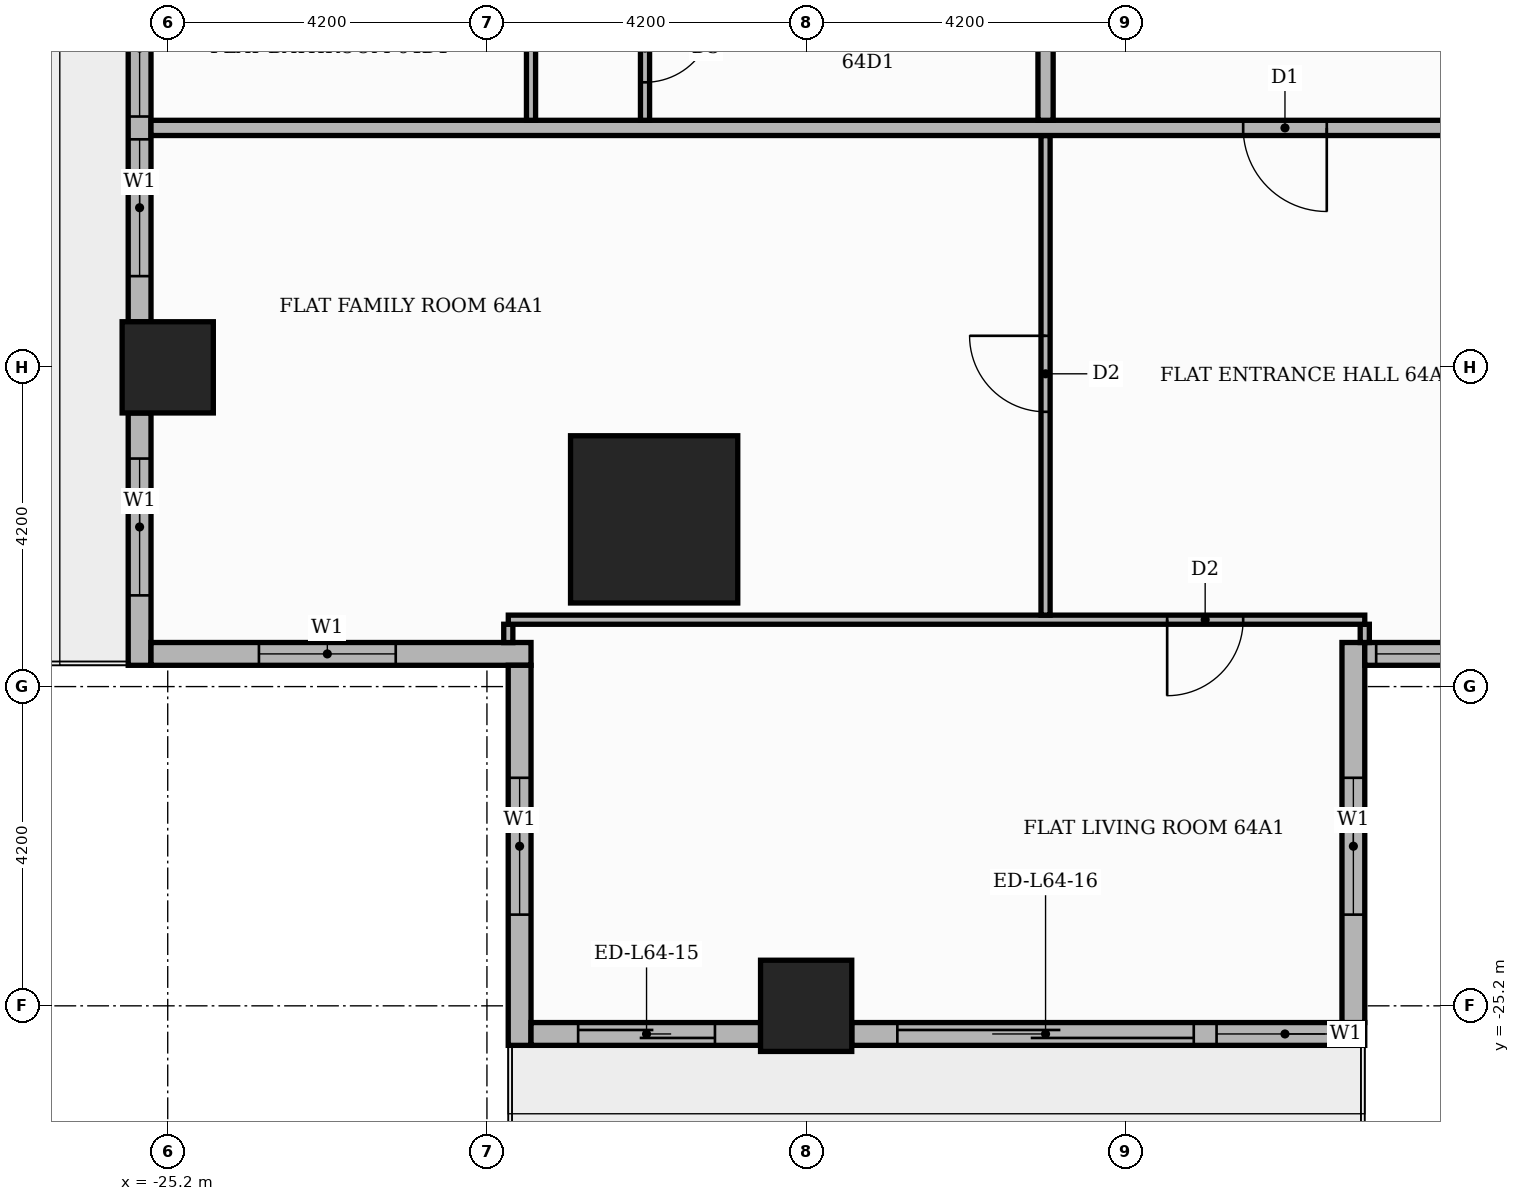
"""IFC4 building model, lengths in metres.
Left out: names, types, materials, properties, quantities, classifications, styles, units other than length and angle.
Written with IfcOpenShell. Run it as: python <this file> out.ifc"""

import sys

from ifc_helpers import new_model, si_unit, direction, frame, frame_2d, origin, origin_2d, place, context, subcontext, project, spatial, rectangle, extrude, element, fill, save


model = new_model("IFC4")
c1 = context("Model", 3, precision=1e-05, world=origin(), true_north=direction((0.0, 1.0)))
c2 = subcontext(c1, "Body", "Model", "MODEL_VIEW")
j1 = project(units=[si_unit("LENGTHUNIT", "METRE"), si_unit("PLANEANGLEUNIT", "RADIAN")], contexts=[c1])
p1 = place(None, origin())
s1 = spatial("IfcSite", under=j1, at=p1, CompositionType="ELEMENT")
p2 = place(p1, origin())
s2 = spatial("IfcBuilding", under=s1, at=p2, CompositionType="ELEMENT")
p3 = place(p2, frame((0.0, 0.0, 267.9)))
s3 = spatial("IfcBuildingStorey", under=s2, at=p3, CompositionType="ELEMENT", Elevation=267.9)
p4 = place(p3, frame((-18.8, -18.8, 0.0), z_axis=(0.0, 0.0, 1.0), x_axis=(1.0, 0.0, 0.0)))
e1 = element("IfcColumn", 1, at=p4, inside=s3, PredefinedType="COLUMN", context=c2, shape_type="SweptSolid", body=[
    extrude(rectangle(XDim=2.2, YDim=2.2, at=origin_2d()), origin(), (0.0, 0.0, 1.0), 3.9),
])
for number, where, z_axis, x_axis in (
    (2, (-16.8, -25.2, 0.0), (0.0, 0.0, 1.0), (1.0, 0.0, 0.0)),
    (3, (-25.2, -16.8, 0.0), (0.0, 0.0, 1.0), (1.0, 0.0, 0.0)),
):
    element("IfcColumn", number, at=place(p3, frame(where, z_axis=z_axis, x_axis=x_axis)), inside=s3, PredefinedType="COLUMN", context=c2, shape_type="SweptSolid", body=[
        extrude(rectangle(XDim=1.2, YDim=1.2, at=origin_2d()), origin(), (0.0, 0.0, 1.0), 3.9),
    ])
p5 = place(p3, frame((-25.57, -9.0, 0.0), z_axis=(0.0, 0.0, 1.0), x_axis=(0.0, -1.0, 0.0)))
e4 = element("IfcWall", 4, at=p5, inside=s3, PredefinedType="STANDARD", context=c2, shape_type="SweptSolid", body=[
    extrude(rectangle(XDim=7.2, YDim=0.3, at=frame_2d((3.6, 0.0))), origin(), (0.0, 0.0, 1.0), 3.48),
])
p6 = place(p5, frame((0.6, 0.0, 0.9)))
e5 = element("IfcOpeningElement", 5, at=p6, cuts=e4, PredefinedType="OPENING", context=c2, shape_type="SweptSolid", body=[
    extrude(rectangle(XDim=1.8, YDim=2.1, at=frame_2d((0.9, 1.05))), frame((0.0, 0.16, 0.0), z_axis=(0.0, -1.0, 0.0), x_axis=(1.0, 0.0, 0.0)), (0.0, 0.0, 1.0), 0.32),
])
p7 = place(p5, frame((2.7, 0.0, 0.9)))
e6 = element("IfcOpeningElement", 6, at=p7, cuts=e4, PredefinedType="OPENING", context=c2, shape_type="SweptSolid", body=[
    extrude(rectangle(XDim=1.8, YDim=2.1, at=frame_2d((0.9, 1.05))), frame((0.0, 0.16, 0.0), z_axis=(0.0, -1.0, 0.0), x_axis=(1.0, 0.0, 0.0)), (0.0, 0.0, 1.0), 0.32),
])
p8 = place(p5, frame((4.8, 0.0, 0.9)))
e7 = element("IfcOpeningElement", 7, at=p8, cuts=e4, PredefinedType="OPENING", context=c2, shape_type="SweptSolid", body=[
    extrude(rectangle(XDim=1.8, YDim=2.1, at=frame_2d((0.9, 1.05))), frame((0.0, 0.16, 0.0), z_axis=(0.0, -1.0, 0.0), x_axis=(1.0, 0.0, 0.0)), (0.0, 0.0, 1.0), 0.32),
])
p9 = place(p3, frame((-25.57, -17.4, 0.0), z_axis=(0.0, 0.0, 1.0), x_axis=(0.0, -1.0, 0.0)))
e8 = element("IfcWall", 8, at=p9, inside=s3, PredefinedType="STANDARD", context=c2, shape_type="SweptSolid", body=[
    extrude(rectangle(XDim=3.32, YDim=0.3, at=frame_2d((1.66, 0.0))), origin(), (0.0, 0.0, 1.0), 3.48),
])
p10 = place(p9, frame((0.6, 0.0, 0.9)))
e9 = element("IfcOpeningElement", 9, at=p10, cuts=e8, PredefinedType="OPENING", context=c2, shape_type="SweptSolid", body=[
    extrude(rectangle(XDim=1.8, YDim=2.1, at=frame_2d((0.9, 1.05))), frame((0.0, 0.16, 0.0), z_axis=(0.0, -1.0, 0.0), x_axis=(1.0, 0.0, 0.0)), (0.0, 0.0, 1.0), 0.32),
])
p11 = place(p3, frame((-25.42, -20.57, 0.0), z_axis=(0.0, 0.0, 1.0), x_axis=(1.0, 0.0, 0.0)))
e10 = element("IfcWall", 10, at=p11, inside=s3, PredefinedType="STANDARD", context=c2, shape_type="SweptSolid", body=[
    extrude(rectangle(XDim=5.0, YDim=0.3, at=frame_2d((2.5, 0.0))), origin(), (0.0, 0.0, 1.0), 3.48),
])
p12 = place(p11, frame((1.42, 0.0, 0.9)))
e11 = element("IfcOpeningElement", 11, at=p12, cuts=e10, PredefinedType="OPENING", context=c2, shape_type="SweptSolid", body=[
    extrude(rectangle(XDim=1.8, YDim=2.1, at=frame_2d((0.9, 1.05))), frame((0.0, 0.16, 0.0), z_axis=(0.0, -1.0, 0.0), x_axis=(1.0, 0.0, 0.0)), (0.0, 0.0, 1.0), 0.32),
])
p13 = place(p3, frame((-20.57, -20.72, 0.0), z_axis=(0.0, 0.0, 1.0), x_axis=(0.0, -1.0, 0.0)))
e12 = element("IfcWall", 12, at=p13, inside=s3, PredefinedType="STANDARD", context=c2, shape_type="SweptSolid", body=[
    extrude(rectangle(XDim=5.0, YDim=0.3, at=frame_2d((2.5, 0.0))), origin(), (0.0, 0.0, 1.0), 3.48),
])
p14 = place(p13, frame((1.48, 0.0, 0.9)))
e13 = element("IfcOpeningElement", 13, at=p14, cuts=e12, PredefinedType="OPENING", context=c2, shape_type="SweptSolid", body=[
    extrude(rectangle(XDim=1.8, YDim=2.1, at=frame_2d((0.9, 1.05))), frame((0.0, 0.16, 0.0), z_axis=(0.0, -1.0, 0.0), x_axis=(1.0, 0.0, 0.0)), (0.0, 0.0, 1.0), 0.32),
])
p15 = place(p3, frame((-20.42, -25.57, 0.0), z_axis=(0.0, 0.0, 1.0), x_axis=(1.0, 0.0, 0.0)))
e14 = element("IfcWall", 14, at=p15, inside=s3, PredefinedType="STANDARD", context=c2, shape_type="SweptSolid", body=[
    extrude(rectangle(XDim=3.02, YDim=0.3, at=frame_2d((1.51, 0.0))), origin(), (0.0, 0.0, 1.0), 3.48),
])
p16 = place(p15, frame((0.62, 0.0, 0.0)))
e15 = element("IfcOpeningElement", 15, at=p16, cuts=e14, PredefinedType="OPENING", context=c2, shape_type="SweptSolid", body=[
    extrude(rectangle(XDim=1.8, YDim=2.4, at=frame_2d((0.9, 1.2))), frame((0.0, 0.16, 0.0), z_axis=(0.0, -1.0, 0.0), x_axis=(1.0, 0.0, 0.0)), (0.0, 0.0, 1.0), 0.32),
])
p17 = place(p3, frame((-16.2, -25.57, 0.0), z_axis=(0.0, 0.0, 1.0), x_axis=(1.0, 0.0, 0.0)))
e16 = element("IfcWall", 16, at=p17, inside=s3, PredefinedType="STANDARD", context=c2, shape_type="SweptSolid", body=[
    extrude(rectangle(XDim=6.75, YDim=0.3, at=frame_2d((3.375, 0.0))), origin(), (0.0, 0.0, 1.0), 3.48),
])
p18 = place(p17, frame((0.6, 0.0, 0.0)))
e17 = element("IfcOpeningElement", 17, at=p18, cuts=e16, PredefinedType="OPENING", context=c2, shape_type="SweptSolid", body=[
    extrude(rectangle(XDim=3.9, YDim=2.4, at=frame_2d((1.95, 1.2))), frame((0.0, 0.16, 0.0), z_axis=(0.0, -1.0, 0.0), x_axis=(1.0, 0.0, 0.0)), (0.0, 0.0, 1.0), 0.32),
])
p19 = place(p17, frame((4.8, 0.0, 0.9)))
e18 = element("IfcOpeningElement", 18, at=p19, cuts=e16, PredefinedType="OPENING", context=c2, shape_type="SweptSolid", body=[
    extrude(rectangle(XDim=1.8, YDim=2.1, at=frame_2d((0.9, 1.05))), frame((0.0, 0.16, 0.0), z_axis=(0.0, -1.0, 0.0), x_axis=(1.0, 0.0, 0.0)), (0.0, 0.0, 1.0), 0.32),
])
p20 = place(p3, frame((-9.6, -25.42, 0.0), z_axis=(0.0, 0.0, 1.0), x_axis=(0.0, 1.0, 0.0)))
e19 = element("IfcWall", 19, at=p20, inside=s3, PredefinedType="STANDARD", context=c2, shape_type="SweptSolid", body=[
    extrude(rectangle(XDim=5.0, YDim=0.3, at=frame_2d((2.5, 0.0))), origin(), (0.0, 0.0, 1.0), 3.48),
])
p21 = place(p20, frame((1.42, 0.0, 0.9)))
e20 = element("IfcOpeningElement", 20, at=p21, cuts=e19, PredefinedType="OPENING", context=c2, shape_type="SweptSolid", body=[
    extrude(rectangle(XDim=1.8, YDim=2.1, at=frame_2d((0.9, 1.05))), frame((0.0, 0.16, 0.0), z_axis=(0.0, -1.0, 0.0), x_axis=(1.0, 0.0, 0.0)), (0.0, 0.0, 1.0), 0.32),
])
p22 = place(p3, frame((-9.45, -20.57, 0.0), z_axis=(0.0, 0.0, 1.0), x_axis=(1.0, 0.0, 0.0)))
e21 = element("IfcWall", 21, at=p22, inside=s3, PredefinedType="STANDARD", context=c2, shape_type="SweptSolid", body=[
    extrude(rectangle(XDim=19.2, YDim=0.3, at=frame_2d((9.6, 0.0))), origin(), (0.0, 0.0, 1.0), 3.48),
])
p23 = place(p22, frame((0.15, 0.0, 0.9)))
e22 = element("IfcOpeningElement", 22, at=p23, cuts=e21, PredefinedType="OPENING", context=c2, shape_type="SweptSolid", body=[
    extrude(rectangle(XDim=6.0, YDim=2.1, at=frame_2d((3.0, 1.05))), frame((0.0, 0.16, 0.0), z_axis=(0.0, -1.0, 0.0), x_axis=(1.0, 0.0, 0.0)), (0.0, 0.0, 1.0), 0.32),
])
p24 = place(p22, frame((6.45, 0.0, 0.9)))
e23 = element("IfcOpeningElement", 23, at=p24, cuts=e21, PredefinedType="OPENING", context=c2, shape_type="SweptSolid", body=[
    extrude(rectangle(XDim=6.0, YDim=2.1, at=frame_2d((3.0, 1.05))), frame((0.0, 0.16, 0.0), z_axis=(0.0, -1.0, 0.0), x_axis=(1.0, 0.0, 0.0)), (0.0, 0.0, 1.0), 0.32),
])
p25 = place(p22, frame((12.75, 0.0, 0.9)))
e24 = element("IfcOpeningElement", 24, at=p25, cuts=e21, PredefinedType="OPENING", context=c2, shape_type="SweptSolid", body=[
    extrude(rectangle(XDim=6.0, YDim=2.1, at=frame_2d((3.0, 1.05))), frame((0.0, 0.16, 0.0), z_axis=(0.0, -1.0, 0.0), x_axis=(1.0, 0.0, 0.0)), (0.0, 0.0, 1.0), 0.32),
])
p26 = place(p3, frame((-20.719, -20.421, 0.0), z_axis=(0.0, 0.0, 1.0), x_axis=(0.0, 1.0, 0.0)))
e25 = element("IfcWall", 25, at=p26, inside=s3, PredefinedType="PARTITIONING", context=c2, shape_type="SweptSolid", body=[
    extrude(rectangle(XDim=0.241, YDim=0.12, at=frame_2d((0.121, 0.0))), origin(), (0.0, 0.0, 1.0), 3.48),
])
p27 = place(p3, frame((-9.45, -20.42, 0.0), z_axis=(0.0, 0.0, 1.0), x_axis=(0.0, 1.0, 0.0)))
e26 = element("IfcWall", 26, at=p27, inside=s3, PredefinedType="PARTITIONING", context=c2, shape_type="SweptSolid", body=[
    extrude(rectangle(XDim=0.24, YDim=0.12, at=frame_2d((0.12, 0.0))), origin(), (0.0, 0.0, 1.0), 3.48),
])
p28 = place(p3, frame((-20.719, -20.12, 0.0), z_axis=(0.0, 0.0, 1.0), x_axis=(1.0, 0.0, 0.0)))
e27 = element("IfcWall", 27, at=p28, inside=s3, PredefinedType="PARTITIONING", context=c2, shape_type="SweptSolid", body=[
    extrude(rectangle(XDim=11.269, YDim=0.12, at=frame_2d((5.635, 0.0))), origin(), (0.0, 0.0, 1.0), 3.48),
])
p29 = place(p28, frame((8.669, 0.0, 0.0)))
e28 = element("IfcOpeningElement", 28, at=p29, cuts=e27, PredefinedType="OPENING", context=c2, shape_type="SweptSolid", body=[
    extrude(rectangle(XDim=1.0, YDim=2.1, at=frame_2d((0.5, 1.05))), frame((0.0, 0.07, 0.0), z_axis=(0.0, -1.0, 0.0), x_axis=(1.0, 0.0, 0.0)), (0.0, 0.0, 1.0), 0.14),
])
p30 = place(p3, frame((-13.65, -20.06, 0.0), z_axis=(0.0, 0.0, 1.0), x_axis=(0.0, 1.0, 0.0)))
e29 = element("IfcWall", 29, at=p30, inside=s3, PredefinedType="PARTITIONING", context=c2, shape_type="SweptSolid", body=[
    extrude(rectangle(XDim=6.31, YDim=0.12, at=frame_2d((3.155, 0.0))), origin(), (0.0, 0.0, 1.0), 3.48),
])
p31 = place(p30, frame((2.675, 0.0, 0.0)))
e30 = element("IfcOpeningElement", 30, at=p31, cuts=e29, PredefinedType="OPENING", context=c2, shape_type="SweptSolid", body=[
    extrude(rectangle(XDim=1.0, YDim=2.1, at=frame_2d((0.5, 1.05))), frame((0.0, 0.07, 0.0), z_axis=(0.0, -1.0, 0.0), x_axis=(1.0, 0.0, 0.0)), (0.0, 0.0, 1.0), 0.14),
])
p32 = place(p3, frame((-25.42, -13.65, 0.0), z_axis=(0.0, 0.0, 1.0), x_axis=(1.0, 0.0, 0.0)))
e31 = element("IfcWall", 31, at=p32, inside=s3, PredefinedType="PARTITIONING", context=c2, shape_type="SweptSolid", body=[
    extrude(rectangle(XDim=39.07, YDim=0.2, at=frame_2d((19.535, 0.0))), origin(), (0.0, 0.0, 1.0), 3.48),
])
p33 = place(p32, frame((14.37, 0.0, 0.0)))
e32 = element("IfcOpeningElement", 32, at=p33, cuts=e31, PredefinedType="OPENING", context=c2, shape_type="SweptSolid", body=[
    extrude(rectangle(XDim=1.1, YDim=2.4, at=frame_2d((0.55, 1.2))), frame((0.0, 0.11, 0.0), z_axis=(0.0, -1.0, 0.0), x_axis=(1.0, 0.0, 0.0)), (0.0, 0.0, 1.0), 0.22),
])
p34 = place(p3, frame((-20.42, -13.55, 0.0), z_axis=(0.0, 0.0, 1.0), x_axis=(0.0, 1.0, 0.0)))
e33 = element("IfcWall", 33, at=p34, inside=s3, PredefinedType="PARTITIONING", context=c2, shape_type="SweptSolid", body=[
    extrude(rectangle(XDim=1.94, YDim=0.12, at=frame_2d((0.97, 0.0))), origin(), (0.0, 0.0, 1.0), 3.48),
])
p35 = place(p3, frame((-18.92, -13.55, 0.0), z_axis=(0.0, 0.0, 1.0), x_axis=(0.0, 1.0, 0.0)))
e34 = element("IfcWall", 34, at=p35, inside=s3, PredefinedType="PARTITIONING", context=c2, shape_type="SweptSolid", body=[
    extrude(rectangle(XDim=1.94, YDim=0.12, at=frame_2d((0.97, 0.0))), origin(), (0.0, 0.0, 1.0), 3.48),
])
p36 = place(p35, frame((0.5, 0.0, 0.0)))
e35 = element("IfcOpeningElement", 35, at=p36, cuts=e34, PredefinedType="OPENING", context=c2, shape_type="SweptSolid", body=[
    extrude(rectangle(XDim=0.9, YDim=2.1, at=frame_2d((0.45, 1.05))), frame((0.0, 0.07, 0.0), z_axis=(0.0, -1.0, 0.0), x_axis=(1.0, 0.0, 0.0)), (0.0, 0.0, 1.0), 0.14),
])
p37 = place(p3, frame((-13.65, -13.55, 0.0), z_axis=(0.0, 0.0, 1.0), x_axis=(0.0, 1.0, 0.0)))
e36 = element("IfcWall", 36, at=p37, inside=s3, PredefinedType="PARTITIONING", context=c2, shape_type="SweptSolid", body=[
    extrude(rectangle(XDim=2.45, YDim=0.2, at=frame_2d((1.225, 0.0))), origin(), (0.0, 0.0, 1.0), 3.48),
])
p38 = place(p7, origin())
e37 = element("IfcWindow", 37, at=p38, inside=s3, PartitioningType="SINGLE_PANEL", PredefinedType="WINDOW", context=c2, shape_type="SweptSolid", body=[
    extrude(rectangle(XDim=1.8, YDim=2.1, at=frame_2d((0.9, 1.05))), frame((0.0, 0.03, 0.0), z_axis=(0.0, -1.0, 0.0), x_axis=(1.0, 0.0, 0.0)), (0.0, 0.0, 1.0), 0.06),
])
fill(e6, e37)
p39 = place(p8, origin())
e38 = element("IfcWindow", 38, at=p39, inside=s3, PartitioningType="SINGLE_PANEL", PredefinedType="WINDOW", context=c2, shape_type="SweptSolid", body=[
    extrude(rectangle(XDim=1.8, YDim=2.1, at=frame_2d((0.9, 1.05))), frame((0.0, 0.03, 0.0), z_axis=(0.0, -1.0, 0.0), x_axis=(1.0, 0.0, 0.0)), (0.0, 0.0, 1.0), 0.06),
])
fill(e7, e38)
p40 = place(p10, origin())
e39 = element("IfcWindow", 39, at=p40, inside=s3, PartitioningType="SINGLE_PANEL", PredefinedType="WINDOW", context=c2, shape_type="SweptSolid", body=[
    extrude(rectangle(XDim=1.8, YDim=2.1, at=frame_2d((0.9, 1.05))), frame((0.0, 0.03, 0.0), z_axis=(0.0, -1.0, 0.0), x_axis=(1.0, 0.0, 0.0)), (0.0, 0.0, 1.0), 0.06),
])
fill(e9, e39)
p41 = place(p12, origin())
e40 = element("IfcWindow", 40, at=p41, inside=s3, PartitioningType="SINGLE_PANEL", PredefinedType="WINDOW", context=c2, shape_type="SweptSolid", body=[
    extrude(rectangle(XDim=1.8, YDim=2.1, at=frame_2d((0.9, 1.05))), frame((0.0, 0.03, 0.0), z_axis=(0.0, -1.0, 0.0), x_axis=(1.0, 0.0, 0.0)), (0.0, 0.0, 1.0), 0.06),
])
fill(e11, e40)
p42 = place(p14, origin())
e41 = element("IfcWindow", 41, at=p42, inside=s3, PartitioningType="SINGLE_PANEL", PredefinedType="WINDOW", context=c2, shape_type="SweptSolid", body=[
    extrude(rectangle(XDim=1.8, YDim=2.1, at=frame_2d((0.9, 1.05))), frame((0.0, 0.03, 0.0), z_axis=(0.0, -1.0, 0.0), x_axis=(1.0, 0.0, 0.0)), (0.0, 0.0, 1.0), 0.06),
])
fill(e13, e41)
p43 = place(p16, origin())
e42 = element("IfcDoor", 42, at=p43, inside=s3, OperationType="SLIDING_TO_RIGHT", PredefinedType="DOOR", context=c2, shape_type="SweptSolid", body=[
    extrude(rectangle(XDim=1.8, YDim=2.4, at=frame_2d((0.9, 1.2))), frame((0.0, 0.025, 0.0), z_axis=(0.0, -1.0, 0.0), x_axis=(1.0, 0.0, 0.0)), (0.0, 0.0, 1.0), 0.05),
])
fill(e15, e42)
p44 = place(p18, origin())
e43 = element("IfcDoor", 43, at=p44, inside=s3, OperationType="SLIDING_TO_LEFT", PredefinedType="DOOR", context=c2, shape_type="SweptSolid", body=[
    extrude(rectangle(XDim=3.9, YDim=2.4, at=frame_2d((1.95, 1.2))), frame((0.0, 0.025, 0.0), z_axis=(0.0, -1.0, 0.0), x_axis=(1.0, 0.0, 0.0)), (0.0, 0.0, 1.0), 0.05),
])
fill(e17, e43)
p45 = place(p19, origin())
e44 = element("IfcWindow", 44, at=p45, inside=s3, PartitioningType="SINGLE_PANEL", PredefinedType="WINDOW", context=c2, shape_type="SweptSolid", body=[
    extrude(rectangle(XDim=1.8, YDim=2.1, at=frame_2d((0.9, 1.05))), frame((0.0, 0.03, 0.0), z_axis=(0.0, -1.0, 0.0), x_axis=(1.0, 0.0, 0.0)), (0.0, 0.0, 1.0), 0.06),
])
fill(e18, e44)
p46 = place(p21, origin())
e45 = element("IfcWindow", 45, at=p46, inside=s3, PartitioningType="SINGLE_PANEL", PredefinedType="WINDOW", context=c2, shape_type="SweptSolid", body=[
    extrude(rectangle(XDim=1.8, YDim=2.1, at=frame_2d((0.9, 1.05))), frame((0.0, 0.03, 0.0), z_axis=(0.0, -1.0, 0.0), x_axis=(1.0, 0.0, 0.0)), (0.0, 0.0, 1.0), 0.06),
])
fill(e20, e45)
p47 = place(p23, origin())
e46 = element("IfcWindow", 46, at=p47, inside=s3, PartitioningType="SINGLE_PANEL", PredefinedType="WINDOW", context=c2, shape_type="SweptSolid", body=[
    extrude(rectangle(XDim=6.0, YDim=2.1, at=frame_2d((3.0, 1.05))), frame((0.0, 0.03, 0.0), z_axis=(0.0, -1.0, 0.0), x_axis=(1.0, 0.0, 0.0)), (0.0, 0.0, 1.0), 0.06),
])
fill(e22, e46)
p48 = place(p33, frame((1.1, 0.0, 0.0), z_axis=(0.0, 0.0, 1.0), x_axis=(-1.0, 0.0, 0.0)))
e47 = element("IfcDoor", 47, at=p48, inside=s3, OperationType="SINGLE_SWING_RIGHT", PredefinedType="DOOR", context=c2, shape_type="SweptSolid", body=[
    extrude(rectangle(XDim=1.1, YDim=2.4, at=frame_2d((0.55, 1.2))), frame((0.0, 0.025, 0.0), z_axis=(0.0, -1.0, 0.0), x_axis=(1.0, 0.0, 0.0)), (0.0, 0.0, 1.0), 0.05),
])
fill(e32, e47)
p49 = place(p31, origin())
e48 = element("IfcDoor", 48, at=p49, inside=s3, OperationType="SINGLE_SWING_RIGHT", PredefinedType="DOOR", context=c2, shape_type="SweptSolid", body=[
    extrude(rectangle(XDim=1.0, YDim=2.1, at=frame_2d((0.5, 1.05))), frame((0.0, 0.025, 0.0), z_axis=(0.0, -1.0, 0.0), x_axis=(1.0, 0.0, 0.0)), (0.0, 0.0, 1.0), 0.05),
])
fill(e30, e48)
p50 = place(p29, frame((1.0, 0.0, 0.0), z_axis=(0.0, 0.0, 1.0), x_axis=(-1.0, 0.0, 0.0)))
e49 = element("IfcDoor", 49, at=p50, inside=s3, OperationType="SINGLE_SWING_LEFT", PredefinedType="DOOR", context=c2, shape_type="SweptSolid", body=[
    extrude(rectangle(XDim=1.0, YDim=2.1, at=frame_2d((0.5, 1.05))), frame((0.0, 0.025, 0.0), z_axis=(0.0, -1.0, 0.0), x_axis=(1.0, 0.0, 0.0)), (0.0, 0.0, 1.0), 0.05),
])
fill(e28, e49)
p51 = place(p36, frame((0.9, 0.0, 0.0), z_axis=(0.0, 0.0, 1.0), x_axis=(-1.0, 0.0, 0.0)))
e50 = element("IfcDoor", 50, at=p51, inside=s3, OperationType="SINGLE_SWING_RIGHT", PredefinedType="DOOR", context=c2, shape_type="SweptSolid", body=[
    extrude(rectangle(XDim=0.9, YDim=2.1, at=frame_2d((0.45, 1.05))), frame((0.0, 0.025, 0.0), z_axis=(0.0, -1.0, 0.0), x_axis=(1.0, 0.0, 0.0)), (0.0, 0.0, 1.0), 0.05),
])
fill(e35, e50)
save(model, sys.argv[1])
